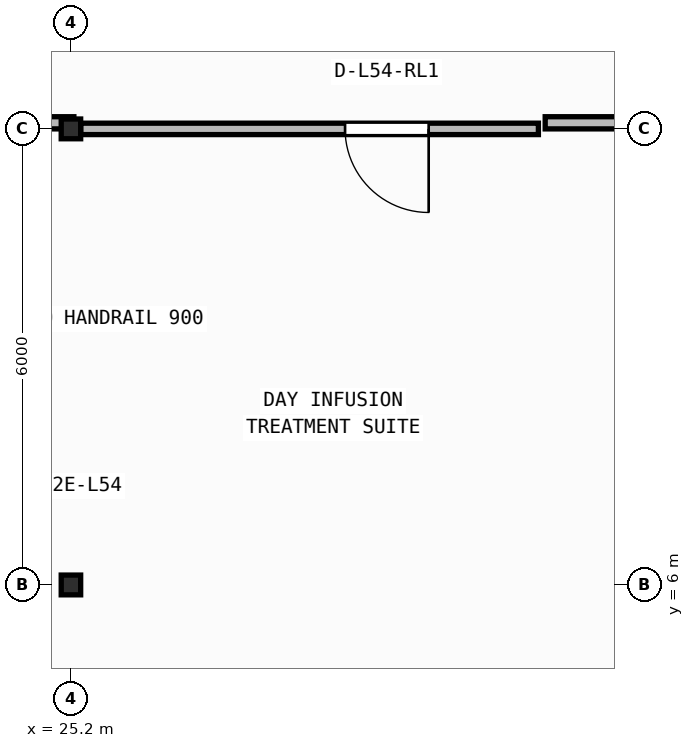
"""IFC4 building model, lengths in metres.
Left out: names, types, materials, properties, quantities, classifications, styles, units other than length and angle.
Written with IfcOpenShell. Run it as: python <this file> out.ifc"""

import sys

from ifc_helpers import new_model, si_unit, direction, frame, frame_2d, origin, origin_2d, place, context, subcontext, project, spatial, rectangle, i_section, extrude, element, fill, save


model = new_model("IFC4")
c1 = context("Model", 3, precision=1e-05, world=origin(), true_north=direction((0.0, 1.0)))
c2 = subcontext(c1, "Body", "Model", "MODEL_VIEW")
j1 = project(units=[si_unit("LENGTHUNIT", "METRE"), si_unit("PLANEANGLEUNIT", "RADIAN")], contexts=[c1])
p1 = place(None, origin())
s1 = spatial("IfcSite", under=j1, at=p1, CompositionType="ELEMENT")
p2 = place(p1, origin())
s2 = spatial("IfcBuilding", under=s1, at=p2, CompositionType="ELEMENT")
p3 = place(p2, frame((0.0, 0.0, 219.75)))
s3 = spatial("IfcBuildingStorey", under=s2, at=p3, CompositionType="ELEMENT", Elevation=219.75)
for number, where, z_axis, x_axis in (
    (1, (25.2, 6.0, 0.0), (0.0, 0.0, 1.0), (1.0, 0.0, 0.0)),
    (2, (25.2, 12.0, 0.0), (0.0, 0.0, 1.0), (1.0, 0.0, 0.0)),
):
    element("IfcColumn", number, at=place(p3, frame(where, z_axis=z_axis, x_axis=x_axis)), inside=s3, PredefinedType="COLUMN", context=c2, shape_type="SweptSolid", body=[
        extrude(i_section(OverallWidth=0.256, OverallDepth=0.26, WebThickness=0.01, FlangeThickness=0.017, FilletRadius=0.013, at=origin_2d()), origin(), (0.0, 0.0, 1.0), 3.95),
    ])
p4 = place(p3, frame((31.35, 12.0, 0.0), z_axis=(0.0, 0.0, 1.0), x_axis=(-1.0, 0.0, 0.0)))
e3 = element("IfcWall", 3, at=p4, inside=s3, PredefinedType="PARTITIONING", context=c2, shape_type="SweptSolid", body=[
    extrude(rectangle(XDim=6.022, YDim=0.15, at=frame_2d((3.011, 0.0))), origin(), (0.0, 0.0, 1.0), 3.152),
])
p5 = place(p4, frame((1.444, 0.0, 0.0)))
e4 = element("IfcOpeningElement", 4, at=p5, cuts=e3, PredefinedType="OPENING", context=c2, shape_type="SweptSolid", body=[
    extrude(rectangle(XDim=1.1, YDim=2.1, at=frame_2d((0.55, 1.05))), frame((0.0, 0.085, 0.0), z_axis=(0.0, -1.0, 0.0), x_axis=(1.0, 0.0, 0.0)), (0.0, 0.0, 1.0), 0.17),
])
p6 = place(p3, frame((24.02, 12.08, 0.0), z_axis=(0.0, 0.0, 1.0), x_axis=(1.0, 0.0, 0.0)))
e5 = element("IfcWall", 5, at=p6, inside=s3, PredefinedType="PARTITIONING", context=c2, shape_type="SweptSolid", body=[
    extrude(rectangle(XDim=1.219, YDim=0.16, at=frame_2d((0.609, 0.0))), origin(), (0.0, 0.0, 1.0), 3.152),
])
p7 = place(p3, frame((31.439, 12.08, 0.0), z_axis=(0.0, 0.0, 1.0), x_axis=(1.0, 0.0, 0.0)))
e6 = element("IfcWall", 6, at=p7, inside=s3, PredefinedType="PARTITIONING", context=c2, shape_type="SweptSolid", body=[
    extrude(rectangle(XDim=2.199, YDim=0.16, at=frame_2d((1.1, 0.0))), origin(), (0.0, 0.0, 1.0), 3.152),
])
p8 = place(p5, origin())
e7 = element("IfcDoor", 7, at=p8, inside=s3, OperationType="SINGLE_SWING_LEFT", PredefinedType="DOOR", context=c2, shape_type="SweptSolid", body=[
    extrude(rectangle(XDim=1.1, YDim=2.1, at=frame_2d((0.55, 1.05))), frame((0.0, 0.025, 0.0), z_axis=(0.0, -1.0, 0.0), x_axis=(1.0, 0.0, 0.0)), (0.0, 0.0, 1.0), 0.05),
])
fill(e4, e7)
save(model, sys.argv[1])
